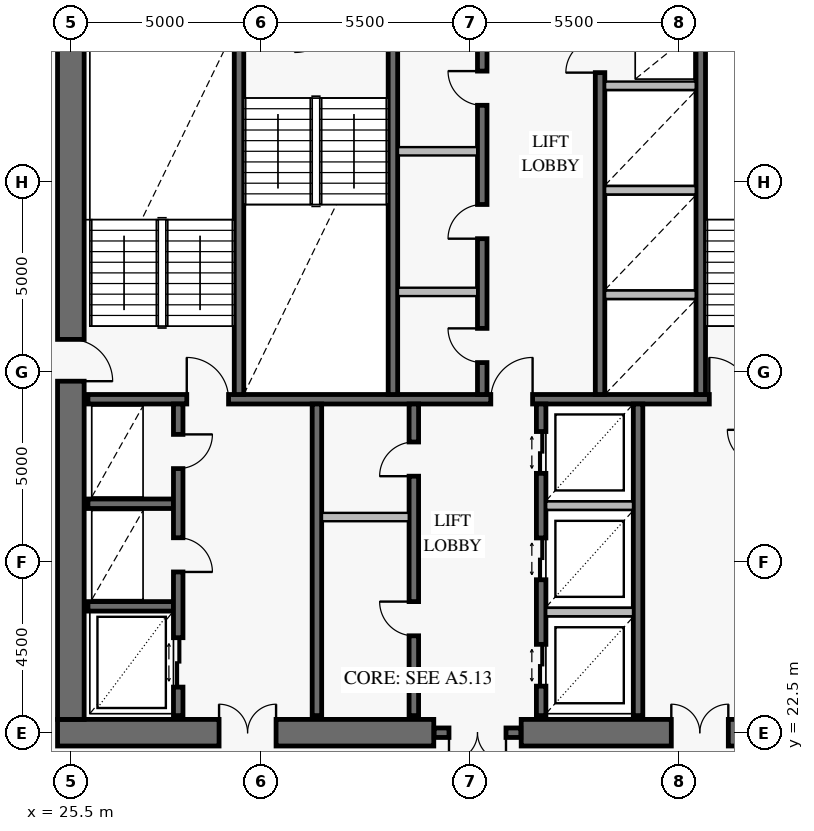
"""IFC4 building model, lengths in metres.
Left out: names, types, materials, properties, quantities, classifications, styles, units other than length and angle.
Written with IfcOpenShell. Run it as: python <this file> out.ifc"""

import sys

from ifc_helpers import new_model, si_unit, direction, frame, frame_2d, origin, place, context, subcontext, project, spatial, rectangle, extrude, element, fill, save


model = new_model("IFC4")
c1 = context("Model", 3, precision=1e-05, world=origin(), true_north=direction((0.0, 1.0)))
c2 = subcontext(c1, "Body", "Model", "MODEL_VIEW")
j1 = project(units=[si_unit("LENGTHUNIT", "METRE"), si_unit("PLANEANGLEUNIT", "RADIAN")], contexts=[c1])
p1 = place(None, origin())
s1 = spatial("IfcSite", under=j1, at=p1, CompositionType="ELEMENT")
p2 = place(p1, origin())
s2 = spatial("IfcBuilding", under=s1, at=p2, CompositionType="ELEMENT")
p3 = place(p2, frame((0.0, 0.0, 196.0)))
s3 = spatial("IfcBuildingStorey", under=s2, at=p3, CompositionType="ELEMENT", Elevation=196.0)
p4 = place(p3, frame((25.15, 22.5, 0.0), z_axis=(0.0, 0.0, 1.0), x_axis=(1.0, 0.0, 0.0)))
e1 = element("IfcWall", 1, at=p4, inside=s3, PredefinedType="SHEAR", context=c2, shape_type="SweptSolid", body=[
    extrude(rectangle(XDim=9.9, YDim=0.7, at=frame_2d((4.95, 0.0))), origin(), (0.0, 0.0, 1.0), 3.8),
])
p5 = place(p4, frame((4.25, 0.0, 0.0)))
e2 = element("IfcOpeningElement", 2, at=p5, cuts=e1, PredefinedType="OPENING", context=c2, shape_type="SweptSolid", body=[
    extrude(rectangle(XDim=1.5, YDim=2.15, at=frame_2d((0.75, 1.075))), frame((0.0, 0.362, 0.0), z_axis=(0.0, -1.0, 0.0), x_axis=(1.0, 0.0, 0.0)), (0.0, 0.0, 1.0), 0.724),
])
p6 = place(p3, frame((37.35, 22.5, 0.0), z_axis=(0.0, 0.0, 1.0), x_axis=(1.0, 0.0, 0.0)))
e3 = element("IfcWall", 3, at=p6, inside=s3, PredefinedType="SHEAR", context=c2, shape_type="SweptSolid", body=[
    extrude(rectangle(XDim=9.5, YDim=0.7, at=frame_2d((4.75, 0.0))), origin(), (0.0, 0.0, 1.0), 3.8),
])
p7 = place(p6, frame((3.95, 0.0, 0.0)))
e4 = element("IfcOpeningElement", 4, at=p7, cuts=e3, PredefinedType="OPENING", context=c2, shape_type="SweptSolid", body=[
    extrude(rectangle(XDim=1.5, YDim=2.15, at=frame_2d((0.75, 1.075))), frame((0.0, 0.362, 0.0), z_axis=(0.0, -1.0, 0.0), x_axis=(1.0, 0.0, 0.0)), (0.0, 0.0, 1.0), 0.724),
])
p8 = place(p3, frame((25.5, 22.85, 0.0), z_axis=(0.0, 0.0, 1.0), x_axis=(0.0, 1.0, 0.0)))
e5 = element("IfcWall", 5, at=p8, inside=s3, PredefinedType="SHEAR", context=c2, shape_type="SweptSolid", body=[
    extrude(rectangle(XDim=18.3, YDim=0.7, at=frame_2d((9.15, 0.0))), origin(), (0.0, 0.0, 1.0), 3.8),
])
p9 = place(p8, frame((8.9, 0.0, 0.0)))
e6 = element("IfcOpeningElement", 6, at=p9, cuts=e5, PredefinedType="OPENING", context=c2, shape_type="SweptSolid", body=[
    extrude(rectangle(XDim=1.1, YDim=2.15, at=frame_2d((0.55, 1.075))), frame((0.0, 0.362, 0.0), z_axis=(0.0, -1.0, 0.0), x_axis=(1.0, 0.0, 0.0)), (0.0, 0.0, 1.0), 0.724),
])
p10 = place(p3, frame((35.06, 22.5, 0.0), z_axis=(0.0, 0.0, 1.0), x_axis=(1.0, 0.0, 0.0)))
e7 = element("IfcWall", 7, at=p10, inside=s3, PredefinedType="SOLIDWALL", context=c2, shape_type="SweptSolid", body=[
    extrude(rectangle(XDim=2.28, YDim=0.25, at=frame_2d((1.14, 0.0))), origin(), (0.0, 0.0, 1.0), 3.8),
])
p11 = place(p10, frame((0.39, 0.0, 0.0)))
e8 = element("IfcOpeningElement", 8, at=p11, cuts=e7, PredefinedType="OPENING", context=c2, shape_type="SweptSolid", body=[
    extrude(rectangle(XDim=1.5, YDim=2.15, at=frame_2d((0.75, 1.075))), frame((0.0, 0.137, 0.0), z_axis=(0.0, -1.0, 0.0), x_axis=(1.0, 0.0, 0.0)), (0.0, 0.0, 1.0), 0.274),
])
p12 = place(p3, frame((25.95, 31.275, 0.0), z_axis=(0.0, 0.0, 1.0), x_axis=(1.0, 0.0, 0.0)))
e9 = element("IfcWall", 9, at=p12, inside=s3, PredefinedType="SOLIDWALL", context=c2, shape_type="SweptSolid", body=[
    extrude(rectangle(XDim=20.1, YDim=0.25, at=frame_2d((10.05, 0.0))), origin(), (0.0, 0.0, 1.0), 3.8),
])
p13 = place(p12, frame((2.6, 0.0, 0.0)))
e10 = element("IfcOpeningElement", 10, at=p13, cuts=e9, PredefinedType="OPENING", context=c2, shape_type="SweptSolid", body=[
    extrude(rectangle(XDim=1.1, YDim=2.15, at=frame_2d((0.55, 1.075))), frame((0.0, 0.137, 0.0), z_axis=(0.0, -1.0, 0.0), x_axis=(1.0, 0.0, 0.0)), (0.0, 0.0, 1.0), 0.274),
])
p14 = place(p12, frame((10.6, 0.0, 0.0)))
e11 = element("IfcOpeningElement", 11, at=p14, cuts=e9, PredefinedType="OPENING", context=c2, shape_type="SweptSolid", body=[
    extrude(rectangle(XDim=1.1, YDim=2.15, at=frame_2d((0.55, 1.075))), frame((0.0, 0.137, 0.0), z_axis=(0.0, -1.0, 0.0), x_axis=(1.0, 0.0, 0.0)), (0.0, 0.0, 1.0), 0.274),
])
p15 = place(p12, frame((16.35, 0.0, 0.0)))
e12 = element("IfcOpeningElement", 12, at=p15, cuts=e9, PredefinedType="OPENING", context=c2, shape_type="SweptSolid", body=[
    extrude(rectangle(XDim=1.1, YDim=2.15, at=frame_2d((0.55, 1.075))), frame((0.0, 0.137, 0.0), z_axis=(0.0, -1.0, 0.0), x_axis=(1.0, 0.0, 0.0)), (0.0, 0.0, 1.0), 0.274),
])
for number, where, z_axis, x_axis in (
    (13, (29.925, 31.4, 0.0), (0.0, 0.0, 1.0), (0.0, 1.0, 0.0)),
    (14, (33.975, 31.4, 0.0), (0.0, 0.0, 1.0), (0.0, 1.0, 0.0)),
    (15, (42.075, 31.4, 0.0), (0.0, 0.0, 1.0), (0.0, 1.0, 0.0)),
):
    element("IfcWall", number, at=place(p3, frame(where, z_axis=z_axis, x_axis=x_axis)), inside=s3, PredefinedType="SOLIDWALL", context=c2, shape_type="SweptSolid", body=[
        extrude(rectangle(XDim=9.7, YDim=0.25, at=frame_2d((4.85, 0.0))), origin(), (0.0, 0.0, 1.0), 3.8),
    ])
p16 = place(p3, frame((36.325, 31.4, 0.0), z_axis=(0.0, 0.0, 1.0), x_axis=(0.0, 1.0, 0.0)))
e16 = element("IfcWall", 16, at=p16, inside=s3, PredefinedType="SOLIDWALL", context=c2, shape_type="SweptSolid", body=[
    extrude(rectangle(XDim=9.65, YDim=0.25, at=frame_2d((4.825, 0.0))), origin(), (0.0, 0.0, 1.0), 3.8),
])
p17 = place(p16, frame((0.84, 0.0, 0.0)))
e17 = element("IfcOpeningElement", 17, at=p17, cuts=e16, PredefinedType="OPENING", context=c2, shape_type="SweptSolid", body=[
    extrude(rectangle(XDim=0.9, YDim=2.1, at=frame_2d((0.45, 1.05))), frame((0.0, 0.137, 0.0), z_axis=(0.0, -1.0, 0.0), x_axis=(1.0, 0.0, 0.0)), (0.0, 0.0, 1.0), 0.274),
])
p18 = place(p16, frame((4.1, 0.0, 0.0)))
e18 = element("IfcOpeningElement", 18, at=p18, cuts=e16, PredefinedType="OPENING", context=c2, shape_type="SweptSolid", body=[
    extrude(rectangle(XDim=0.9, YDim=2.1, at=frame_2d((0.45, 1.05))), frame((0.0, 0.137, 0.0), z_axis=(0.0, -1.0, 0.0), x_axis=(1.0, 0.0, 0.0)), (0.0, 0.0, 1.0), 0.274),
])
p19 = place(p16, frame((7.61, 0.0, 0.0)))
e19 = element("IfcOpeningElement", 19, at=p19, cuts=e16, PredefinedType="OPENING", context=c2, shape_type="SweptSolid", body=[
    extrude(rectangle(XDim=0.9, YDim=2.1, at=frame_2d((0.45, 1.05))), frame((0.0, 0.137, 0.0), z_axis=(0.0, -1.0, 0.0), x_axis=(1.0, 0.0, 0.0)), (0.0, 0.0, 1.0), 0.274),
])
p20 = place(p3, frame((39.425, 31.4, 0.0), z_axis=(0.0, 0.0, 1.0), x_axis=(0.0, 1.0, 0.0)))
e20 = element("IfcWall", 20, at=p20, inside=s3, PredefinedType="SOLIDWALL", context=c2, shape_type="SweptSolid", body=[
    extrude(rectangle(XDim=9.65, YDim=0.25, at=frame_2d((4.825, 0.0))), origin(), (0.0, 0.0, 1.0), 3.8),
])
p21 = place(p20, frame((8.47, 0.0, 0.0)))
e21 = element("IfcOpeningElement", 21, at=p21, cuts=e20, PredefinedType="OPENING", context=c2, shape_type="SweptSolid", body=[
    extrude(rectangle(XDim=0.9, YDim=2.1, at=frame_2d((0.45, 1.05))), frame((0.0, 0.137, 0.0), z_axis=(0.0, -1.0, 0.0), x_axis=(1.0, 0.0, 0.0)), (0.0, 0.0, 1.0), 0.274),
])
for number, where, z_axis, x_axis in (
    (22, (25.95, 25.825, 0.0), (0.0, 0.0, 1.0), (1.0, 0.0, 0.0)),
    (23, (25.95, 28.525, 0.0), (0.0, 0.0, 1.0), (1.0, 0.0, 0.0)),
):
    element("IfcWall", number, at=place(p3, frame(where, z_axis=z_axis, x_axis=x_axis)), inside=s3, PredefinedType="SOLIDWALL", context=c2, shape_type="SweptSolid", body=[
        extrude(rectangle(XDim=2.25, YDim=0.25, at=frame_2d((1.125, 0.0))), origin(), (0.0, 0.0, 1.0), 3.8),
    ])
p22 = place(p3, frame((28.325, 22.95, 0.0), z_axis=(0.0, 0.0, 1.0), x_axis=(0.0, 1.0, 0.0)))
e24 = element("IfcWall", 24, at=p22, inside=s3, PredefinedType="SOLIDWALL", context=c2, shape_type="SweptSolid", body=[
    extrude(rectangle(XDim=8.2, YDim=0.25, at=frame_2d((4.1, 0.0))), origin(), (0.0, 0.0, 1.0), 3.8),
])
p23 = place(p22, frame((0.75, 0.0, 0.0)))
e25 = element("IfcOpeningElement", 25, at=p23, cuts=e24, PredefinedType="OPENING", context=c2, shape_type="SweptSolid", body=[
    extrude(rectangle(XDim=1.3, YDim=2.3, at=frame_2d((0.65, 1.15))), frame((0.0, 0.137, 0.0), z_axis=(0.0, -1.0, 0.0), x_axis=(1.0, 0.0, 0.0)), (0.0, 0.0, 1.0), 0.274),
])
p24 = place(p22, frame((3.78, 0.0, 0.0)))
e26 = element("IfcOpeningElement", 26, at=p24, cuts=e24, PredefinedType="OPENING", context=c2, shape_type="SweptSolid", body=[
    extrude(rectangle(XDim=0.9, YDim=2.1, at=frame_2d((0.45, 1.05))), frame((0.0, 0.137, 0.0), z_axis=(0.0, -1.0, 0.0), x_axis=(1.0, 0.0, 0.0)), (0.0, 0.0, 1.0), 0.274),
])
p25 = place(p22, frame((6.5, 0.0, 0.0)))
e27 = element("IfcOpeningElement", 27, at=p25, cuts=e24, PredefinedType="OPENING", context=c2, shape_type="SweptSolid", body=[
    extrude(rectangle(XDim=0.9, YDim=2.1, at=frame_2d((0.45, 1.05))), frame((0.0, 0.137, 0.0), z_axis=(0.0, -1.0, 0.0), x_axis=(1.0, 0.0, 0.0)), (0.0, 0.0, 1.0), 0.274),
])
p26 = place(p3, frame((31.975, 22.95, 0.0), z_axis=(0.0, 0.0, 1.0), x_axis=(0.0, 1.0, 0.0)))
e28 = element("IfcWall", 28, at=p26, inside=s3, PredefinedType="SOLIDWALL", context=c2, shape_type="SweptSolid", body=[
    extrude(rectangle(XDim=8.2, YDim=0.25, at=frame_2d((4.1, 0.0))), origin(), (0.0, 0.0, 1.0), 3.8),
])
p27 = place(p3, frame((34.525, 22.95, 0.0), z_axis=(0.0, 0.0, 1.0), x_axis=(0.0, 1.0, 0.0)))
e29 = element("IfcWall", 29, at=p27, inside=s3, PredefinedType="SOLIDWALL", context=c2, shape_type="SweptSolid", body=[
    extrude(rectangle(XDim=8.2, YDim=0.25, at=frame_2d((4.1, 0.0))), origin(), (0.0, 0.0, 1.0), 3.8),
])
p28 = place(p27, frame((2.1, 0.0, 0.0)))
e30 = element("IfcOpeningElement", 30, at=p28, cuts=e29, PredefinedType="OPENING", context=c2, shape_type="SweptSolid", body=[
    extrude(rectangle(XDim=0.9, YDim=2.1, at=frame_2d((0.45, 1.05))), frame((0.0, 0.137, 0.0), z_axis=(0.0, -1.0, 0.0), x_axis=(1.0, 0.0, 0.0)), (0.0, 0.0, 1.0), 0.274),
])
p29 = place(p27, frame((6.3, 0.0, 0.0)))
e31 = element("IfcOpeningElement", 31, at=p29, cuts=e29, PredefinedType="OPENING", context=c2, shape_type="SweptSolid", body=[
    extrude(rectangle(XDim=0.9, YDim=2.1, at=frame_2d((0.45, 1.05))), frame((0.0, 0.137, 0.0), z_axis=(0.0, -1.0, 0.0), x_axis=(1.0, 0.0, 0.0)), (0.0, 0.0, 1.0), 0.274),
])
p30 = place(p3, frame((37.875, 22.95, 0.0), z_axis=(0.0, 0.0, 1.0), x_axis=(0.0, 1.0, 0.0)))
e32 = element("IfcWall", 32, at=p30, inside=s3, PredefinedType="SOLIDWALL", context=c2, shape_type="SweptSolid", body=[
    extrude(rectangle(XDim=8.2, YDim=0.25, at=frame_2d((4.1, 0.0))), origin(), (0.0, 0.0, 1.0), 3.8),
])
p31 = place(p30, frame((0.775, 0.0, 0.0)))
e33 = element("IfcOpeningElement", 33, at=p31, cuts=e32, PredefinedType="OPENING", context=c2, shape_type="SweptSolid", body=[
    extrude(rectangle(XDim=1.1, YDim=2.2, at=frame_2d((0.55, 1.1))), frame((0.0, 0.137, 0.0), z_axis=(0.0, -1.0, 0.0), x_axis=(1.0, 0.0, 0.0)), (0.0, 0.0, 1.0), 0.274),
])
p32 = place(p30, frame((3.575, 0.0, 0.0)))
e34 = element("IfcOpeningElement", 34, at=p32, cuts=e32, PredefinedType="OPENING", context=c2, shape_type="SweptSolid", body=[
    extrude(rectangle(XDim=1.1, YDim=2.2, at=frame_2d((0.55, 1.1))), frame((0.0, 0.137, 0.0), z_axis=(0.0, -1.0, 0.0), x_axis=(1.0, 0.0, 0.0)), (0.0, 0.0, 1.0), 0.274),
])
p33 = place(p30, frame((6.375, 0.0, 0.0)))
e35 = element("IfcOpeningElement", 35, at=p33, cuts=e32, PredefinedType="OPENING", context=c2, shape_type="SweptSolid", body=[
    extrude(rectangle(XDim=1.1, YDim=2.2, at=frame_2d((0.55, 1.1))), frame((0.0, 0.137, 0.0), z_axis=(0.0, -1.0, 0.0), x_axis=(1.0, 0.0, 0.0)), (0.0, 0.0, 1.0), 0.274),
])
p34 = place(p3, frame((40.425, 22.95, 0.0), z_axis=(0.0, 0.0, 1.0), x_axis=(0.0, 1.0, 0.0)))
e36 = element("IfcWall", 36, at=p34, inside=s3, PredefinedType="SOLIDWALL", context=c2, shape_type="SweptSolid", body=[
    extrude(rectangle(XDim=8.2, YDim=0.25, at=frame_2d((4.1, 0.0))), origin(), (0.0, 0.0, 1.0), 3.8),
])
for number, where, z_axis, x_axis in (
    (37, (34.108, 34.1, 0.0), (0.0, 0.0, 1.0), (1.0, 0.0, 0.0)),
    (38, (34.108, 37.8, 0.0), (0.0, 0.0, 1.0), (1.0, 0.0, 0.0)),
):
    element("IfcWall", number, at=place(p3, frame(where, z_axis=z_axis, x_axis=x_axis)), inside=s3, PredefinedType="PARTITIONING", context=c2, shape_type="SweptSolid", body=[
        extrude(rectangle(XDim=2.084, YDim=0.22, at=frame_2d((1.042, 0.0))), origin(), (0.0, 0.0, 1.0), 3.55),
    ])
for number, where, z_axis, x_axis in (
    (39, (39.558, 34.025, 0.0), (0.0, 0.0, 1.0), (1.0, 0.0, 0.0)),
    (40, (39.558, 36.775, 0.0), (0.0, 0.0, 1.0), (1.0, 0.0, 0.0)),
    (41, (39.558, 39.525, 0.0), (0.0, 0.0, 1.0), (1.0, 0.0, 0.0)),
):
    element("IfcWall", number, at=place(p3, frame(where, z_axis=z_axis, x_axis=x_axis)), inside=s3, PredefinedType="PARTITIONING", context=c2, shape_type="SweptSolid", body=[
        extrude(rectangle(XDim=2.384, YDim=0.22, at=frame_2d((1.192, 0.0))), origin(), (0.0, 0.0, 1.0), 3.55),
    ])
p35 = place(p3, frame((32.108, 28.175, 0.0), z_axis=(0.0, 0.0, 1.0), x_axis=(1.0, 0.0, 0.0)))
e42 = element("IfcWall", 42, at=p35, inside=s3, PredefinedType="PARTITIONING", context=c2, shape_type="SweptSolid", body=[
    extrude(rectangle(XDim=2.284, YDim=0.22, at=frame_2d((1.142, 0.0))), origin(), (0.0, 0.0, 1.0), 3.55),
])
for number, where, z_axis, x_axis in (
    (43, (38.008, 25.675, 0.0), (0.0, 0.0, 1.0), (1.0, 0.0, 0.0)),
    (44, (38.008, 28.475, 0.0), (0.0, 0.0, 1.0), (1.0, 0.0, 0.0)),
):
    element("IfcWall", number, at=place(p3, frame(where, z_axis=z_axis, x_axis=x_axis)), inside=s3, PredefinedType="PARTITIONING", context=c2, shape_type="SweptSolid", body=[
        extrude(rectangle(XDim=2.284, YDim=0.22, at=frame_2d((1.142, 0.0))), origin(), (0.0, 0.0, 1.0), 3.55),
    ])
p36 = place(p9, frame((1.1, 0.0, 0.0), z_axis=(0.0, 0.0, 1.0), x_axis=(-1.0, 0.0, 0.0)))
e45 = element("IfcDoor", 45, at=p36, inside=s3, OperationType="SINGLE_SWING_RIGHT", PredefinedType="USERDEFINED", context=c2, shape_type="SweptSolid", body=[
    extrude(rectangle(XDim=1.1, YDim=2.15, at=frame_2d((0.55, 1.075))), frame((0.0, 0.025, 0.0), z_axis=(0.0, -1.0, 0.0), x_axis=(1.0, 0.0, 0.0)), (0.0, 0.0, 1.0), 0.05),
])
fill(e6, e45)
p37 = place(p5, origin())
e46 = element("IfcDoor", 46, at=p37, inside=s3, OperationType="DOUBLE_DOOR_SINGLE_SWING", PredefinedType="DOOR", context=c2, shape_type="SweptSolid", body=[
    extrude(rectangle(XDim=1.5, YDim=2.15, at=frame_2d((0.75, 1.075))), frame((0.0, 0.025, 0.0), z_axis=(0.0, -1.0, 0.0), x_axis=(1.0, 0.0, 0.0)), (0.0, 0.0, 1.0), 0.05),
])
fill(e2, e46)
p38 = place(p7, origin())
e47 = element("IfcDoor", 47, at=p38, inside=s3, OperationType="DOUBLE_DOOR_SINGLE_SWING", PredefinedType="DOOR", context=c2, shape_type="SweptSolid", body=[
    extrude(rectangle(XDim=1.5, YDim=2.15, at=frame_2d((0.75, 1.075))), frame((0.0, 0.025, 0.0), z_axis=(0.0, -1.0, 0.0), x_axis=(1.0, 0.0, 0.0)), (0.0, 0.0, 1.0), 0.05),
])
fill(e4, e47)
p39 = place(p11, frame((1.5, 0.0, 0.0), z_axis=(0.0, 0.0, 1.0), x_axis=(-1.0, 0.0, 0.0)))
e48 = element("IfcDoor", 48, at=p39, inside=s3, OperationType="DOUBLE_DOOR_SINGLE_SWING", PredefinedType="DOOR", context=c2, shape_type="SweptSolid", body=[
    extrude(rectangle(XDim=1.5, YDim=2.15, at=frame_2d((0.75, 1.075))), frame((0.0, 0.025, 0.0), z_axis=(0.0, -1.0, 0.0), x_axis=(1.0, 0.0, 0.0)), (0.0, 0.0, 1.0), 0.05),
])
fill(e8, e48)
p40 = place(p13, origin())
e49 = element("IfcDoor", 49, at=p40, inside=s3, OperationType="SINGLE_SWING_LEFT", PredefinedType="USERDEFINED", context=c2, shape_type="SweptSolid", body=[
    extrude(rectangle(XDim=1.1, YDim=2.15, at=frame_2d((0.55, 1.075))), frame((0.0, 0.025, 0.0), z_axis=(0.0, -1.0, 0.0), x_axis=(1.0, 0.0, 0.0)), (0.0, 0.0, 1.0), 0.05),
])
fill(e10, e49)
p41 = place(p14, origin())
e50 = element("IfcDoor", 50, at=p41, inside=s3, OperationType="SINGLE_SWING_RIGHT", PredefinedType="USERDEFINED", context=c2, shape_type="SweptSolid", body=[
    extrude(rectangle(XDim=1.1, YDim=2.15, at=frame_2d((0.55, 1.075))), frame((0.0, 0.025, 0.0), z_axis=(0.0, -1.0, 0.0), x_axis=(1.0, 0.0, 0.0)), (0.0, 0.0, 1.0), 0.05),
])
fill(e11, e50)
p42 = place(p15, origin())
e51 = element("IfcDoor", 51, at=p42, inside=s3, OperationType="SINGLE_SWING_LEFT", PredefinedType="USERDEFINED", context=c2, shape_type="SweptSolid", body=[
    extrude(rectangle(XDim=1.1, YDim=2.15, at=frame_2d((0.55, 1.075))), frame((0.0, 0.025, 0.0), z_axis=(0.0, -1.0, 0.0), x_axis=(1.0, 0.0, 0.0)), (0.0, 0.0, 1.0), 0.05),
])
fill(e12, e51)
p43 = place(p17, origin())
e52 = element("IfcDoor", 52, at=p43, inside=s3, OperationType="SINGLE_SWING_RIGHT", PredefinedType="DOOR", context=c2, shape_type="SweptSolid", body=[
    extrude(rectangle(XDim=0.9, YDim=2.1, at=frame_2d((0.45, 1.05))), frame((0.0, 0.025, 0.0), z_axis=(0.0, -1.0, 0.0), x_axis=(1.0, 0.0, 0.0)), (0.0, 0.0, 1.0), 0.05),
])
fill(e17, e52)
p44 = place(p18, origin())
e53 = element("IfcDoor", 53, at=p44, inside=s3, OperationType="SINGLE_SWING_LEFT", PredefinedType="DOOR", context=c2, shape_type="SweptSolid", body=[
    extrude(rectangle(XDim=0.9, YDim=2.1, at=frame_2d((0.45, 1.05))), frame((0.0, 0.025, 0.0), z_axis=(0.0, -1.0, 0.0), x_axis=(1.0, 0.0, 0.0)), (0.0, 0.0, 1.0), 0.05),
])
fill(e18, e53)
p45 = place(p19, origin())
e54 = element("IfcDoor", 54, at=p45, inside=s3, OperationType="SINGLE_SWING_RIGHT", PredefinedType="DOOR", context=c2, shape_type="SweptSolid", body=[
    extrude(rectangle(XDim=0.9, YDim=2.1, at=frame_2d((0.45, 1.05))), frame((0.0, 0.025, 0.0), z_axis=(0.0, -1.0, 0.0), x_axis=(1.0, 0.0, 0.0)), (0.0, 0.0, 1.0), 0.05),
])
fill(e19, e54)
p46 = place(p21, origin())
e55 = element("IfcDoor", 55, at=p46, inside=s3, OperationType="SINGLE_SWING_LEFT", PredefinedType="DOOR", context=c2, shape_type="SweptSolid", body=[
    extrude(rectangle(XDim=0.9, YDim=2.1, at=frame_2d((0.45, 1.05))), frame((0.0, 0.025, 0.0), z_axis=(0.0, -1.0, 0.0), x_axis=(1.0, 0.0, 0.0)), (0.0, 0.0, 1.0), 0.05),
])
fill(e21, e55)
p47 = place(p23, frame((1.3, 0.0, 0.0), z_axis=(0.0, 0.0, 1.0), x_axis=(-1.0, 0.0, 0.0)))
e56 = element("IfcDoor", 56, at=p47, inside=s3, OperationType="DOUBLE_DOOR_SLIDING", PredefinedType="DOOR", context=c2, shape_type="SweptSolid", body=[
    extrude(rectangle(XDim=1.3, YDim=2.3, at=frame_2d((0.65, 1.15))), frame((0.0, 0.025, 0.0), z_axis=(0.0, -1.0, 0.0), x_axis=(1.0, 0.0, 0.0)), (0.0, 0.0, 1.0), 0.05),
])
fill(e25, e56)
p48 = place(p24, frame((0.9, 0.0, 0.0), z_axis=(0.0, 0.0, 1.0), x_axis=(-1.0, 0.0, 0.0)))
e57 = element("IfcDoor", 57, at=p48, inside=s3, OperationType="SINGLE_SWING_RIGHT", PredefinedType="DOOR", context=c2, shape_type="SweptSolid", body=[
    extrude(rectangle(XDim=0.9, YDim=2.1, at=frame_2d((0.45, 1.05))), frame((0.0, 0.025, 0.0), z_axis=(0.0, -1.0, 0.0), x_axis=(1.0, 0.0, 0.0)), (0.0, 0.0, 1.0), 0.05),
])
fill(e26, e57)
p49 = place(p25, frame((0.9, 0.0, 0.0), z_axis=(0.0, 0.0, 1.0), x_axis=(-1.0, 0.0, 0.0)))
e58 = element("IfcDoor", 58, at=p49, inside=s3, OperationType="SINGLE_SWING_LEFT", PredefinedType="DOOR", context=c2, shape_type="SweptSolid", body=[
    extrude(rectangle(XDim=0.9, YDim=2.1, at=frame_2d((0.45, 1.05))), frame((0.0, 0.025, 0.0), z_axis=(0.0, -1.0, 0.0), x_axis=(1.0, 0.0, 0.0)), (0.0, 0.0, 1.0), 0.05),
])
fill(e27, e58)
p50 = place(p28, origin())
e59 = element("IfcDoor", 59, at=p50, inside=s3, OperationType="SINGLE_SWING_RIGHT", PredefinedType="DOOR", context=c2, shape_type="SweptSolid", body=[
    extrude(rectangle(XDim=0.9, YDim=2.1, at=frame_2d((0.45, 1.05))), frame((0.0, 0.025, 0.0), z_axis=(0.0, -1.0, 0.0), x_axis=(1.0, 0.0, 0.0)), (0.0, 0.0, 1.0), 0.05),
])
fill(e30, e59)
p51 = place(p29, origin())
e60 = element("IfcDoor", 60, at=p51, inside=s3, OperationType="SINGLE_SWING_LEFT", PredefinedType="DOOR", context=c2, shape_type="SweptSolid", body=[
    extrude(rectangle(XDim=0.9, YDim=2.1, at=frame_2d((0.45, 1.05))), frame((0.0, 0.025, 0.0), z_axis=(0.0, -1.0, 0.0), x_axis=(1.0, 0.0, 0.0)), (0.0, 0.0, 1.0), 0.05),
])
fill(e31, e60)
p52 = place(p31, origin())
e61 = element("IfcDoor", 61, at=p52, inside=s3, OperationType="DOUBLE_DOOR_SLIDING", PredefinedType="DOOR", context=c2, shape_type="SweptSolid", body=[
    extrude(rectangle(XDim=1.1, YDim=2.2, at=frame_2d((0.55, 1.1))), frame((0.0, 0.025, 0.0), z_axis=(0.0, -1.0, 0.0), x_axis=(1.0, 0.0, 0.0)), (0.0, 0.0, 1.0), 0.05),
])
fill(e33, e61)
p53 = place(p32, origin())
e62 = element("IfcDoor", 62, at=p53, inside=s3, OperationType="DOUBLE_DOOR_SLIDING", PredefinedType="DOOR", context=c2, shape_type="SweptSolid", body=[
    extrude(rectangle(XDim=1.1, YDim=2.2, at=frame_2d((0.55, 1.1))), frame((0.0, 0.025, 0.0), z_axis=(0.0, -1.0, 0.0), x_axis=(1.0, 0.0, 0.0)), (0.0, 0.0, 1.0), 0.05),
])
fill(e34, e62)
p54 = place(p33, origin())
e63 = element("IfcDoor", 63, at=p54, inside=s3, OperationType="DOUBLE_DOOR_SLIDING", PredefinedType="DOOR", context=c2, shape_type="SweptSolid", body=[
    extrude(rectangle(XDim=1.1, YDim=2.2, at=frame_2d((0.55, 1.1))), frame((0.0, 0.025, 0.0), z_axis=(0.0, -1.0, 0.0), x_axis=(1.0, 0.0, 0.0)), (0.0, 0.0, 1.0), 0.05),
])
fill(e35, e63)
save(model, sys.argv[1])
